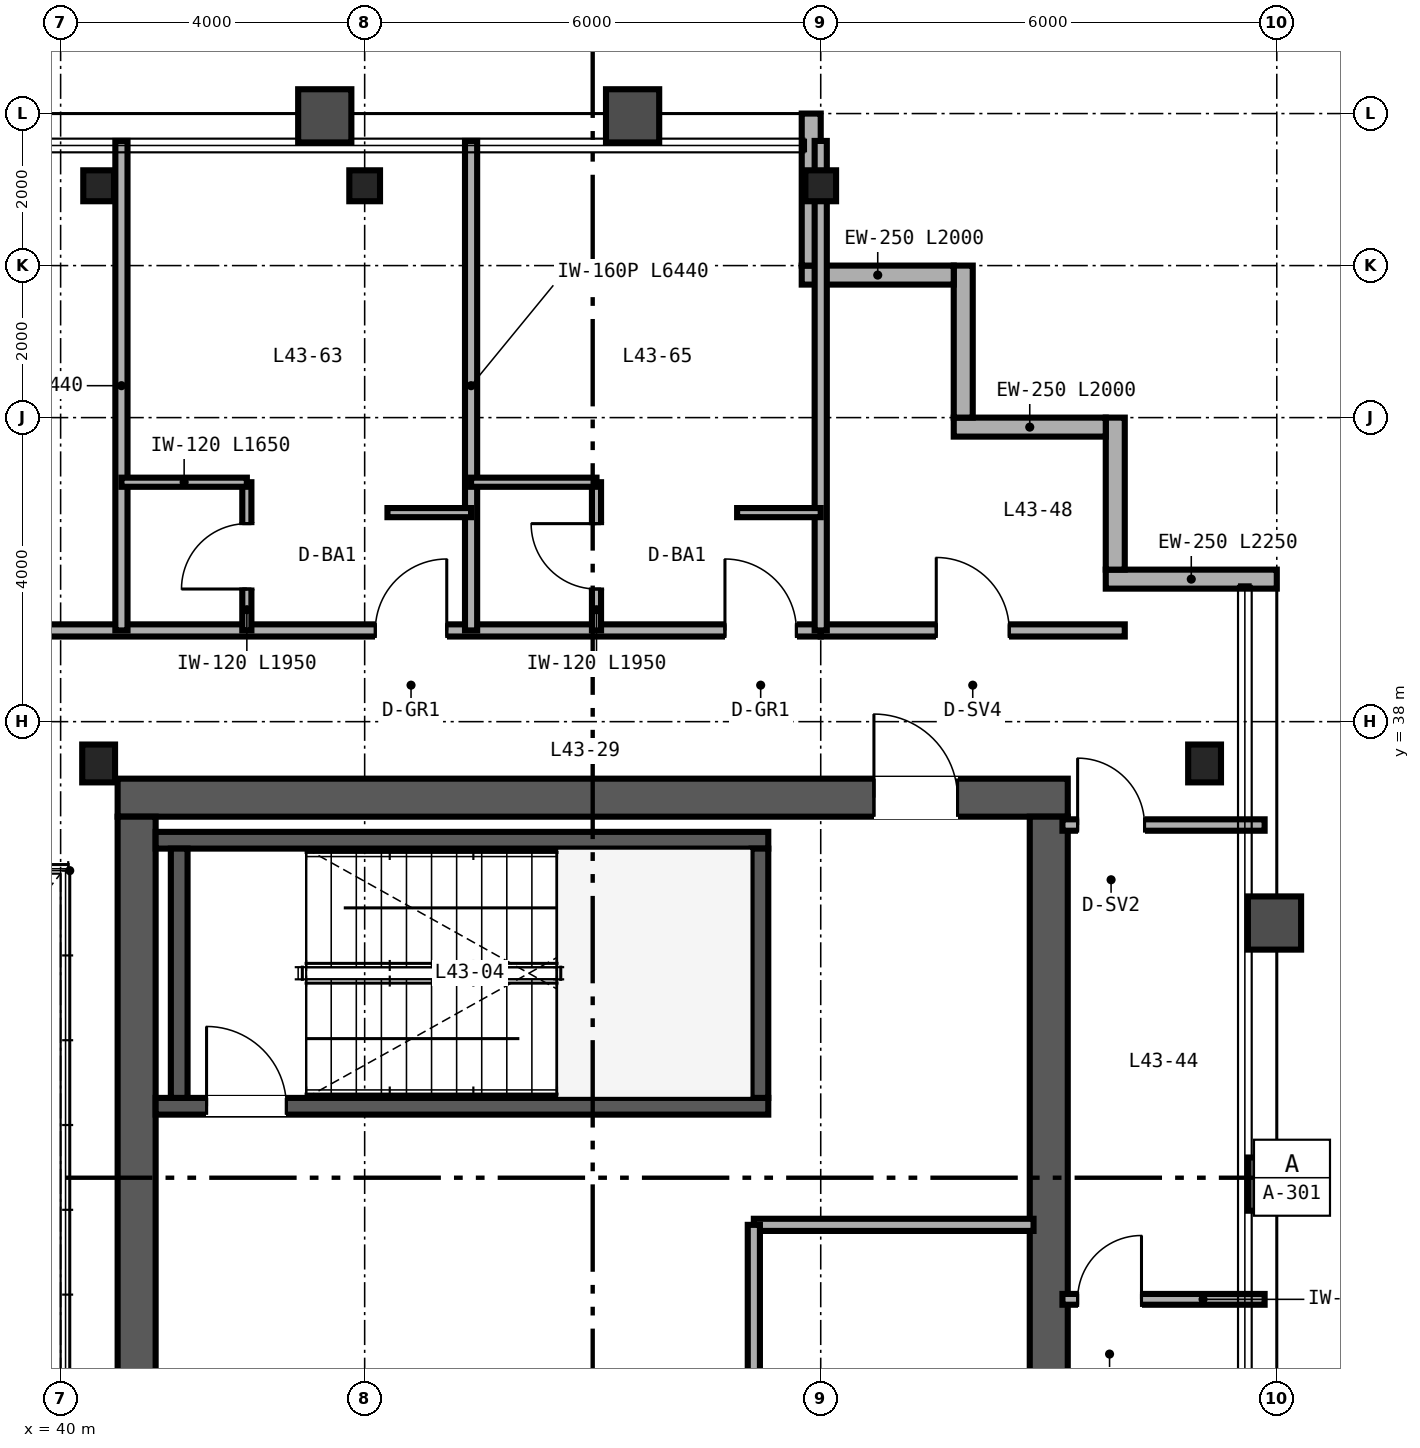
"""IFC4 building model, lengths in metres.
Left out: names, types, materials, properties, quantities, classifications, styles, units other than length and angle.
Written with IfcOpenShell. Run it as: python <this file> out.ifc"""

import sys

from ifc_helpers import new_model, si_unit, direction, frame, frame_2d, origin, origin_2d, place, context, subcontext, project, spatial, rectangle, i_section, extrude, source, transform, mapped, element, fill, save


model = new_model("IFC4")
c1 = context("Model", 3, precision=1e-05, world=origin(), true_north=direction((0.0, 1.0)))
c2 = subcontext(c1, "Body", "Model", "MODEL_VIEW")
j1 = project(units=[si_unit("LENGTHUNIT", "METRE"), si_unit("PLANEANGLEUNIT", "RADIAN")], contexts=[c1])
p1 = place(None, origin())
s1 = spatial("IfcSite", under=j1, at=p1, CompositionType="ELEMENT")
p2 = place(p1, origin())
s2 = spatial("IfcBuilding", under=s1, at=p2, CompositionType="ELEMENT")
p3 = place(p2, frame((0.0, 0.0, 174.0)))
s3 = spatial("IfcBuildingStorey", under=s2, at=p3, CompositionType="ELEMENT", Elevation=174.0)
p4 = place(p3, frame((40.75, 37.0, 0.0), z_axis=(0.0, 0.0, 1.0), x_axis=(1.0, 0.0, 0.0)))
e1 = element("IfcWall", 1, at=p4, inside=s3, PredefinedType="SHEAR", context=c2, shape_type="SweptSolid", body=[
    extrude(rectangle(XDim=12.5, YDim=0.5, at=frame_2d((6.25, 0.0))), origin(), (0.0, 0.0, 1.0), 3.37),
])
p5 = place(p4, frame((9.95, 0.0, 0.0)))
e2 = element("IfcOpeningElement", 2, at=p5, cuts=e1, PredefinedType="OPENING", context=c2, shape_type="SweptSolid", body=[
    extrude(rectangle(XDim=1.1, YDim=2.15, at=frame_2d((0.55, 1.075))), frame((0.0, 0.26, 0.0), z_axis=(0.0, -1.0, 0.0), x_axis=(1.0, 0.0, 0.0)), (0.0, 0.0, 1.0), 0.52),
])
for number, where, z_axis, x_axis in (
    (3, (41.0, 15.25, 0.0), (0.0, 0.0, 1.0), (0.0, 1.0, 0.0)),
    (4, (53.0, 15.25, 0.0), (0.0, 0.0, 1.0), (0.0, 1.0, 0.0)),
):
    element("IfcWall", number, at=place(p3, frame(where, z_axis=z_axis, x_axis=x_axis)), inside=s3, PredefinedType="SHEAR", context=c2, shape_type="SweptSolid", body=[
        extrude(rectangle(XDim=21.5, YDim=0.5, at=frame_2d((10.75, 0.0))), origin(), (0.0, 0.0, 1.0), 3.37),
    ])
p6 = place(p3, frame((41.25, 32.94, 0.0), z_axis=(0.0, 0.0, 1.0), x_axis=(1.0, 0.0, 0.0)))
e5 = element("IfcWall", 5, at=p6, inside=s3, PredefinedType="SHEAR", context=c2, shape_type="SweptSolid", body=[
    extrude(rectangle(XDim=8.06, YDim=0.22, at=frame_2d((4.03, 0.0))), origin(), (0.0, 0.0, 1.0), 3.4),
])
p7 = place(p6, frame((0.67, 0.0, 0.0)))
e6 = element("IfcOpeningElement", 6, at=p7, cuts=e5, PredefinedType="OPENING", context=c2, shape_type="SweptSolid", body=[
    extrude(rectangle(XDim=1.05, YDim=2.15, at=frame_2d((0.525, 1.075))), frame((0.0, 0.12, 0.0), z_axis=(0.0, -1.0, 0.0), x_axis=(1.0, 0.0, 0.0)), (0.0, 0.0, 1.0), 0.24),
])
p8 = place(p3, frame((41.25, 36.44, 0.0), z_axis=(0.0, 0.0, 1.0), x_axis=(1.0, 0.0, 0.0)))
e7 = element("IfcWall", 7, at=p8, inside=s3, PredefinedType="SHEAR", context=c2, shape_type="SweptSolid", body=[
    extrude(rectangle(XDim=8.06, YDim=0.22, at=frame_2d((4.03, 0.0))), origin(), (0.0, 0.0, 1.0), 3.4),
])
for number, where, z_axis, x_axis in (
    (8, (41.56, 33.05, 0.0), (0.0, 0.0, 1.0), (0.0, 1.0, 0.0)),
    (9, (49.2, 33.05, 0.0), (0.0, 0.0, 1.0), (0.0, 1.0, 0.0)),
):
    element("IfcWall", number, at=place(p3, frame(where, z_axis=z_axis, x_axis=x_axis)), inside=s3, PredefinedType="SHEAR", context=c2, shape_type="SweptSolid", body=[
        extrude(rectangle(XDim=3.28, YDim=0.22, at=frame_2d((1.64, 0.0))), origin(), (0.0, 0.0, 1.0), 3.4),
    ])
m1 = source(origin(), c2, "Body", "SweptSolid", [
    extrude(i_section(OverallWidth=0.432, OverallDepth=0.498, WebThickness=0.056, FlangeThickness=0.089, FilletRadius=0.025, at=origin_2d()), origin(), (0.0, 0.0, 1.0), 3.37),
])
for number, where, z_axis, x_axis in (
    (10, (40.5, 37.45, 0.0), (0.0, 0.0, 1.0), (1.0, 0.0, 0.0)),
    (11, (55.05, 37.45, 0.0), (0.0, 0.0, 1.0), (1.0, 0.0, 0.0)),
):
    element("IfcColumn", number, at=place(p3, frame(where, z_axis=z_axis, x_axis=x_axis)), inside=s3, PredefinedType="COLUMN", context=c2, shape_type="MappedRepresentation", body=[
        mapped(m1, transform((0.0, 0.0, 0.0), scale=1.0)),
    ])
m2 = source(origin(), c2, "Body", "SweptSolid", [
    extrude(i_section(OverallWidth=0.404, OverallDepth=0.407, WebThickness=0.027, FlangeThickness=0.044, FilletRadius=0.025, at=origin_2d()), origin(), (0.0, 0.0, 1.0), 3.37),
])
for number, where, z_axis, x_axis in (
    (12, (40.5, 45.05, 0.0), (0.0, 0.0, 1.0), (1.0, 0.0, 0.0)),
    (13, (44.0, 45.05, 0.0), (0.0, 0.0, 1.0), (1.0, 0.0, 0.0)),
    (14, (50.0, 45.05, 0.0), (0.0, 0.0, 1.0), (1.0, 0.0, 0.0)),
):
    element("IfcColumn", number, at=place(p3, frame(where, z_axis=z_axis, x_axis=x_axis)), inside=s3, PredefinedType="COLUMN", context=c2, shape_type="MappedRepresentation", body=[
        mapped(m2, transform((0.0, 0.0, 0.0), scale=1.0)),
    ])
p9 = place(p3, frame((56.0, 39.875, 0.0), z_axis=(0.0, 0.0, 1.0), x_axis=(-1.0, 0.0, 0.0)))
e15 = element("IfcWall", 15, at=p9, inside=s3, PredefinedType="SOLIDWALL", context=c2, shape_type="SweptSolid", body=[
    extrude(rectangle(XDim=2.25, YDim=0.25, at=frame_2d((1.125, 0.0))), origin(), (0.0, 0.0, 1.0), 3.37),
])
for number, where, z_axis, x_axis in (
    (16, (53.875, 40.0, 0.0), (0.0, 0.0, 1.0), (0.0, 1.0, 0.0)),
    (17, (53.75, 41.875, 0.0), (0.0, 0.0, 1.0), (-1.0, 0.0, 0.0)),
    (18, (51.875, 42.0, 0.0), (0.0, 0.0, 1.0), (0.0, 1.0, 0.0)),
    (19, (51.75, 43.875, 0.0), (0.0, 0.0, 1.0), (-1.0, 0.0, 0.0)),
):
    element("IfcWall", number, at=place(p3, frame(where, z_axis=z_axis, x_axis=x_axis)), inside=s3, PredefinedType="SOLIDWALL", context=c2, shape_type="SweptSolid", body=[
        extrude(rectangle(XDim=2.0, YDim=0.25, at=frame_2d((1.0, 0.0))), origin(), (0.0, 0.0, 1.0), 3.37),
    ])
p10 = place(p3, frame((49.875, 44.0, 0.0), z_axis=(0.0, 0.0, 1.0), x_axis=(0.0, 1.0, 0.0)))
e20 = element("IfcWall", 20, at=p10, inside=s3, PredefinedType="SOLIDWALL", context=c2, shape_type="SweptSolid", body=[
    extrude(rectangle(XDim=2.0, YDim=0.25, at=frame_2d((1.0, 0.0))), origin(), (0.0, 0.0, 1.0), 2.677),
])
p11 = place(p3, frame((49.12, 31.38, 0.0), z_axis=(0.0, 0.0, 1.0), x_axis=(1.0, 0.0, 0.0)))
e21 = element("IfcWall", 21, at=p11, inside=s3, PredefinedType="PARTITIONING", context=c2, shape_type="SweptSolid", body=[
    extrude(rectangle(XDim=3.68, YDim=0.16, at=frame_2d((1.84, 0.0))), origin(), (0.0, 0.0, 1.0), 2.47),
])
p12 = place(p3, frame((49.12, 15.25, 0.0), z_axis=(0.0, 0.0, 1.0), x_axis=(0.0, 1.0, 0.0)))
e22 = element("IfcWall", 22, at=p12, inside=s3, PredefinedType="PARTITIONING", context=c2, shape_type="SweptSolid", body=[
    extrude(rectangle(XDim=16.13, YDim=0.16, at=frame_2d((8.065, 0.0))), origin(), (0.0, 0.0, 1.0), 2.443),
])
p13 = place(p12, frame((3.8, 0.0, 0.0)))
e23 = element("IfcOpeningElement", 23, at=p13, cuts=e22, PredefinedType="OPENING", context=c2, shape_type="SweptSolid", body=[
    extrude(rectangle(XDim=0.92, YDim=2.15, at=frame_2d((0.46, 1.075))), frame((0.0, 0.09, 0.0), z_axis=(0.0, -1.0, 0.0), x_axis=(1.0, 0.0, 0.0)), (0.0, 0.0, 1.0), 0.18),
])
p14 = place(p12, frame((11.8, 0.0, 0.0)))
e24 = element("IfcOpeningElement", 24, at=p14, cuts=e22, PredefinedType="OPENING", context=c2, shape_type="SweptSolid", body=[
    extrude(rectangle(XDim=0.9, YDim=2.15, at=frame_2d((0.45, 1.075))), frame((0.0, 0.09, 0.0), z_axis=(0.0, -1.0, 0.0), x_axis=(1.0, 0.0, 0.0)), (0.0, 0.0, 1.0), 0.18),
])
p15 = place(p3, frame((53.18, 36.64, 0.0), z_axis=(0.0, 0.0, 1.0), x_axis=(1.0, 0.0, 0.0)))
e25 = element("IfcWall", 25, at=p15, inside=s3, PredefinedType="PARTITIONING", context=c2, shape_type="SweptSolid", body=[
    extrude(rectangle(XDim=2.66, YDim=0.15, at=frame_2d((1.33, 0.0))), origin(), (0.0, 0.0, 1.0), 2.753),
])
p16 = place(p15, frame((0.2, 0.0, 0.0)))
e26 = element("IfcOpeningElement", 26, at=p16, cuts=e25, PredefinedType="OPENING", context=c2, shape_type="SweptSolid", body=[
    extrude(rectangle(XDim=0.88, YDim=2.15, at=frame_2d((0.44, 1.075))), frame((0.0, 0.085, 0.0), z_axis=(0.0, -1.0, 0.0), x_axis=(1.0, 0.0, 0.0)), (0.0, 0.0, 1.0), 0.17),
])
p17 = place(p3, frame((53.18, 30.4, 0.0), z_axis=(0.0, 0.0, 1.0), x_axis=(1.0, 0.0, 0.0)))
e27 = element("IfcWall", 27, at=p17, inside=s3, PredefinedType="PARTITIONING", context=c2, shape_type="SweptSolid", body=[
    extrude(rectangle(XDim=2.66, YDim=0.142, at=frame_2d((1.33, 0.0))), origin(), (0.0, 0.0, 1.0), 2.753),
])
p18 = place(p17, frame((0.2, 0.0, 0.0)))
e28 = element("IfcOpeningElement", 28, at=p18, cuts=e27, PredefinedType="OPENING", context=c2, shape_type="SweptSolid", body=[
    extrude(rectangle(XDim=0.84, YDim=2.1, at=frame_2d((0.42, 1.05))), frame((0.0, 0.081, 0.0), z_axis=(0.0, -1.0, 0.0), x_axis=(1.0, 0.0, 0.0)), (0.0, 0.0, 1.0), 0.162),
])
p19 = place(p3, frame((50.0, 39.2, 0.0), z_axis=(0.0, 0.0, 1.0), x_axis=(1.0, 0.0, 0.0)))
e29 = element("IfcWall", 29, at=p19, inside=s3, PredefinedType="PARTITIONING", context=c2, shape_type="SweptSolid", body=[
    extrude(rectangle(XDim=4.0, YDim=0.16, at=frame_2d((2.0, 0.0))), origin(), (0.0, 0.0, 1.0), 3.37),
])
p20 = place(p19, frame((1.52, 0.0, 0.0)))
e30 = element("IfcOpeningElement", 30, at=p20, cuts=e29, PredefinedType="OPENING", context=c2, shape_type="SweptSolid", body=[
    extrude(rectangle(XDim=0.96, YDim=2.15, at=frame_2d((0.48, 1.075))), frame((0.0, 0.09, 0.0), z_axis=(0.0, -1.0, 0.0), x_axis=(1.0, 0.0, 0.0)), (0.0, 0.0, 1.0), 0.18),
])
p21 = place(p3, frame((14.0, 39.2, 0.0), z_axis=(0.0, 0.0, 1.0), x_axis=(1.0, 0.0, 0.0)))
e31 = element("IfcWall", 31, at=p21, inside=s3, PredefinedType="PARTITIONING", context=c2, shape_type="SweptSolid", body=[
    extrude(rectangle(XDim=36.0, YDim=0.16, at=frame_2d((18.0, 0.0))), origin(), (0.0, 0.0, 1.0), 2.913),
])
p22 = place(p21, frame((7.5, 0.0, 0.0)))
e32 = element("IfcOpeningElement", 32, at=p22, cuts=e31, PredefinedType="OPENING", context=c2, shape_type="SweptSolid", body=[
    extrude(rectangle(XDim=0.98, YDim=2.2, at=frame_2d((0.49, 1.1))), frame((0.0, 0.09, 0.0), z_axis=(0.0, -1.0, 0.0), x_axis=(1.0, 0.0, 0.0)), (0.0, 0.0, 1.0), 0.18),
])
p23 = place(p21, frame((16.5, 0.0, 0.0)))
e33 = element("IfcOpeningElement", 33, at=p23, cuts=e31, PredefinedType="OPENING", context=c2, shape_type="SweptSolid", body=[
    extrude(rectangle(XDim=0.98, YDim=2.2, at=frame_2d((0.49, 1.1))), frame((0.0, 0.09, 0.0), z_axis=(0.0, -1.0, 0.0), x_axis=(1.0, 0.0, 0.0)), (0.0, 0.0, 1.0), 0.18),
])
p24 = place(p21, frame((21.82, 0.0, 0.0)))
e34 = element("IfcOpeningElement", 34, at=p24, cuts=e31, PredefinedType="OPENING", context=c2, shape_type="SweptSolid", body=[
    extrude(rectangle(XDim=0.96, YDim=2.15, at=frame_2d((0.48, 1.075))), frame((0.0, 0.09, 0.0), z_axis=(0.0, -1.0, 0.0), x_axis=(1.0, 0.0, 0.0)), (0.0, 0.0, 1.0), 0.18),
])
p25 = place(p21, frame((30.14, 0.0, 0.0)))
e35 = element("IfcOpeningElement", 35, at=p25, cuts=e31, PredefinedType="OPENING", context=c2, shape_type="SweptSolid", body=[
    extrude(rectangle(XDim=0.94, YDim=2.15, at=frame_2d((0.47, 1.075))), frame((0.0, 0.09, 0.0), z_axis=(0.0, -1.0, 0.0), x_axis=(1.0, 0.0, 0.0)), (0.0, 0.0, 1.0), 0.18),
])
p26 = place(p21, frame((34.74, 0.0, 0.0)))
e36 = element("IfcOpeningElement", 36, at=p26, cuts=e31, PredefinedType="OPENING", context=c2, shape_type="SweptSolid", body=[
    extrude(rectangle(XDim=0.94, YDim=2.15, at=frame_2d((0.47, 1.075))), frame((0.0, 0.09, 0.0), z_axis=(0.0, -1.0, 0.0), x_axis=(1.0, 0.0, 0.0)), (0.0, 0.0, 1.0), 0.18),
])
p27 = place(p3, frame((50.0, 39.2, 0.0), z_axis=(0.0, 0.0, 1.0), x_axis=(0.0, 1.0, 0.0)))
e37 = element("IfcWall", 37, at=p27, inside=s3, PredefinedType="PARTITIONING", context=c2, shape_type="SweptSolid", body=[
    extrude(rectangle(XDim=6.44, YDim=0.16, at=frame_2d((3.22, 0.0))), origin(), (0.0, 0.0, 1.0), 2.677),
])
p28 = place(p3, frame((40.8, 39.2, 0.0), z_axis=(0.0, 0.0, 1.0), x_axis=(0.0, 1.0, 0.0)))
e38 = element("IfcWall", 38, at=p28, inside=s3, PredefinedType="PARTITIONING", context=c2, shape_type="SweptSolid", body=[
    extrude(rectangle(XDim=6.44, YDim=0.16, at=frame_2d((3.22, 0.0))), origin(), (0.0, 0.0, 1.0), 2.443),
])
p29 = place(p3, frame((45.4, 39.2, 0.0), z_axis=(0.0, 0.0, 1.0), x_axis=(0.0, 1.0, 0.0)))
e39 = element("IfcWall", 39, at=p29, inside=s3, PredefinedType="PARTITIONING", context=c2, shape_type="SweptSolid", body=[
    extrude(rectangle(XDim=6.44, YDim=0.16, at=frame_2d((3.22, 0.0))), origin(), (0.0, 0.0, 1.0), 2.677),
])
p30 = place(p3, frame((42.45, 39.2, 0.0), z_axis=(0.0, 0.0, 1.0), x_axis=(0.0, 1.0, 0.0)))
e40 = element("IfcWall", 40, at=p30, inside=s3, PredefinedType="PARTITIONING", context=c2, shape_type="SweptSolid", body=[
    extrude(rectangle(XDim=1.95, YDim=0.12, at=frame_2d((0.975, 0.0))), origin(), (0.0, 0.0, 1.0), 3.37),
])
p31 = place(p30, frame((0.545, 0.0, 0.0)))
e41 = element("IfcOpeningElement", 41, at=p31, cuts=e40, PredefinedType="OPENING", context=c2, shape_type="SweptSolid", body=[
    extrude(rectangle(XDim=0.86, YDim=2.1, at=frame_2d((0.43, 1.05))), frame((0.0, 0.07, 0.0), z_axis=(0.0, -1.0, 0.0), x_axis=(1.0, 0.0, 0.0)), (0.0, 0.0, 1.0), 0.14),
])
p32 = place(p3, frame((40.8, 41.15, 0.0), z_axis=(0.0, 0.0, 1.0), x_axis=(1.0, 0.0, 0.0)))
e42 = element("IfcWall", 42, at=p32, inside=s3, PredefinedType="PARTITIONING", context=c2, shape_type="SweptSolid", body=[
    extrude(rectangle(XDim=1.65, YDim=0.12, at=frame_2d((0.825, 0.0))), origin(), (0.0, 0.0, 1.0), 3.37),
])
p33 = place(p3, frame((44.3, 40.75, 0.0), z_axis=(0.0, 0.0, 1.0), x_axis=(1.0, 0.0, 0.0)))
e43 = element("IfcWall", 43, at=p33, inside=s3, PredefinedType="PARTITIONING", context=c2, shape_type="SweptSolid", body=[
    extrude(rectangle(XDim=1.1, YDim=0.12, at=frame_2d((0.55, 0.0))), origin(), (0.0, 0.0, 1.0), 3.37),
])
p34 = place(p3, frame((47.05, 39.2, 0.0), z_axis=(0.0, 0.0, 1.0), x_axis=(0.0, 1.0, 0.0)))
e44 = element("IfcWall", 44, at=p34, inside=s3, PredefinedType="PARTITIONING", context=c2, shape_type="SweptSolid", body=[
    extrude(rectangle(XDim=1.95, YDim=0.12, at=frame_2d((0.975, 0.0))), origin(), (0.0, 0.0, 1.0), 3.37),
])
p35 = place(p34, frame((0.545, 0.0, 0.0)))
e45 = element("IfcOpeningElement", 45, at=p35, cuts=e44, PredefinedType="OPENING", context=c2, shape_type="SweptSolid", body=[
    extrude(rectangle(XDim=0.86, YDim=2.1, at=frame_2d((0.43, 1.05))), frame((0.0, 0.07, 0.0), z_axis=(0.0, -1.0, 0.0), x_axis=(1.0, 0.0, 0.0)), (0.0, 0.0, 1.0), 0.14),
])
p36 = place(p3, frame((45.4, 41.15, 0.0), z_axis=(0.0, 0.0, 1.0), x_axis=(1.0, 0.0, 0.0)))
e46 = element("IfcWall", 46, at=p36, inside=s3, PredefinedType="PARTITIONING", context=c2, shape_type="SweptSolid", body=[
    extrude(rectangle(XDim=1.65, YDim=0.12, at=frame_2d((0.825, 0.0))), origin(), (0.0, 0.0, 1.0), 3.37),
])
p37 = place(p3, frame((48.9, 40.75, 0.0), z_axis=(0.0, 0.0, 1.0), x_axis=(1.0, 0.0, 0.0)))
e47 = element("IfcWall", 47, at=p37, inside=s3, PredefinedType="PARTITIONING", context=c2, shape_type="SweptSolid", body=[
    extrude(rectangle(XDim=1.1, YDim=0.12, at=frame_2d((0.55, 0.0))), origin(), (0.0, 0.0, 1.0), 3.37),
])
m3 = source(origin(), c2, "Body", "SweptSolid", [
    extrude(rectangle(XDim=1.05, YDim=2.15, at=frame_2d((0.525, 1.075))), frame((0.0, 0.025, 0.0), z_axis=(0.0, -1.0, 0.0), x_axis=(1.0, 0.0, 0.0)), (0.0, 0.0, 1.0), 0.05),
])
p38 = place(p7, origin())
e48 = element("IfcDoor", 48, at=p38, inside=s3, OperationType="SINGLE_SWING_LEFT", PredefinedType="DOOR", context=c2, shape_type="MappedRepresentation", body=[
    mapped(m3, transform((0.0, 0.0, 0.0), scale=1.0)),
])
fill(e6, e48)
m4 = source(origin(), c2, "Body", "SweptSolid", [
    extrude(rectangle(XDim=1.1, YDim=2.15, at=frame_2d((0.55, 1.075))), frame((0.0, 0.025, 0.0), z_axis=(0.0, -1.0, 0.0), x_axis=(1.0, 0.0, 0.0)), (0.0, 0.0, 1.0), 0.05),
])
p39 = place(p5, origin())
e49 = element("IfcDoor", 49, at=p39, inside=s3, OperationType="SINGLE_SWING_LEFT", PredefinedType="DOOR", context=c2, shape_type="MappedRepresentation", body=[
    mapped(m4, transform((0.0, 0.0, 0.0), scale=1.0)),
])
fill(e2, e49)
m5 = source(origin(), c2, "Body", "SweptSolid", [
    extrude(rectangle(XDim=0.88, YDim=2.15, at=frame_2d((0.44, 1.075))), frame((0.0, 0.025, 0.0), z_axis=(0.0, -1.0, 0.0), x_axis=(1.0, 0.0, 0.0)), (0.0, 0.0, 1.0), 0.05),
])
p40 = place(p16, origin())
e50 = element("IfcDoor", 50, at=p40, inside=s3, OperationType="SINGLE_SWING_LEFT", PredefinedType="DOOR", context=c2, shape_type="MappedRepresentation", body=[
    mapped(m5, transform((0.0, 0.0, 0.0), scale=1.0)),
])
fill(e26, e50)
m6 = source(origin(), c2, "Body", "SweptSolid", [
    extrude(rectangle(XDim=0.84, YDim=2.1, at=frame_2d((0.42, 1.05))), frame((0.0, 0.025, 0.0), z_axis=(0.0, -1.0, 0.0), x_axis=(1.0, 0.0, 0.0)), (0.0, 0.0, 1.0), 0.05),
])
p41 = place(p18, origin())
e51 = element("IfcDoor", 51, at=p41, inside=s3, OperationType="SINGLE_SWING_RIGHT", PredefinedType="DOOR", context=c2, shape_type="MappedRepresentation", body=[
    mapped(m6, transform((0.0, 0.0, 0.0), scale=1.0)),
])
fill(e28, e51)
m7 = source(origin(), c2, "Body", "SweptSolid", [
    extrude(rectangle(XDim=0.96, YDim=2.15, at=frame_2d((0.48, 1.075))), frame((0.0, 0.025, 0.0), z_axis=(0.0, -1.0, 0.0), x_axis=(1.0, 0.0, 0.0)), (0.0, 0.0, 1.0), 0.05),
])
p42 = place(p20, origin())
e52 = element("IfcDoor", 52, at=p42, inside=s3, OperationType="SINGLE_SWING_LEFT", PredefinedType="DOOR", context=c2, shape_type="MappedRepresentation", body=[
    mapped(m7, transform((0.0, 0.0, 0.0), scale=1.0)),
])
fill(e30, e52)
m8 = source(origin(), c2, "Body", "SweptSolid", [
    extrude(rectangle(XDim=0.86, YDim=2.1, at=frame_2d((0.43, 1.05))), frame((0.0, 0.025, 0.0), z_axis=(0.0, -1.0, 0.0), x_axis=(1.0, 0.0, 0.0)), (0.0, 0.0, 1.0), 0.05),
])
p43 = place(p31, origin())
e53 = element("IfcDoor", 53, at=p43, inside=s3, OperationType="SINGLE_SWING_LEFT", PredefinedType="DOOR", context=c2, shape_type="MappedRepresentation", body=[
    mapped(m8, transform((0.0, 0.0, 0.0), scale=1.0)),
])
fill(e41, e53)
p44 = place(p35, origin())
e54 = element("IfcDoor", 54, at=p44, inside=s3, OperationType="SINGLE_SWING_RIGHT", PredefinedType="DOOR", context=c2, shape_type="MappedRepresentation", body=[
    mapped(m8, transform((0.0, 0.0, 0.0), scale=1.0)),
])
fill(e45, e54)
m9 = source(origin(), c2, "Body", "SweptSolid", [
    extrude(rectangle(XDim=0.94, YDim=2.15, at=frame_2d((0.47, 1.075))), frame((0.0, 0.025, 0.0), z_axis=(0.0, -1.0, 0.0), x_axis=(1.0, 0.0, 0.0)), (0.0, 0.0, 1.0), 0.05),
])
p45 = place(p25, origin())
e55 = element("IfcDoor", 55, at=p45, inside=s3, OperationType="SINGLE_SWING_RIGHT", PredefinedType="DOOR", context=c2, shape_type="MappedRepresentation", body=[
    mapped(m9, transform((0.0, 0.0, 0.0), scale=1.0)),
])
fill(e35, e55)
p46 = place(p26, origin())
e56 = element("IfcDoor", 56, at=p46, inside=s3, OperationType="SINGLE_SWING_LEFT", PredefinedType="DOOR", context=c2, shape_type="MappedRepresentation", body=[
    mapped(m9, transform((0.0, 0.0, 0.0), scale=1.0)),
])
fill(e36, e56)
save(model, sys.argv[1])
